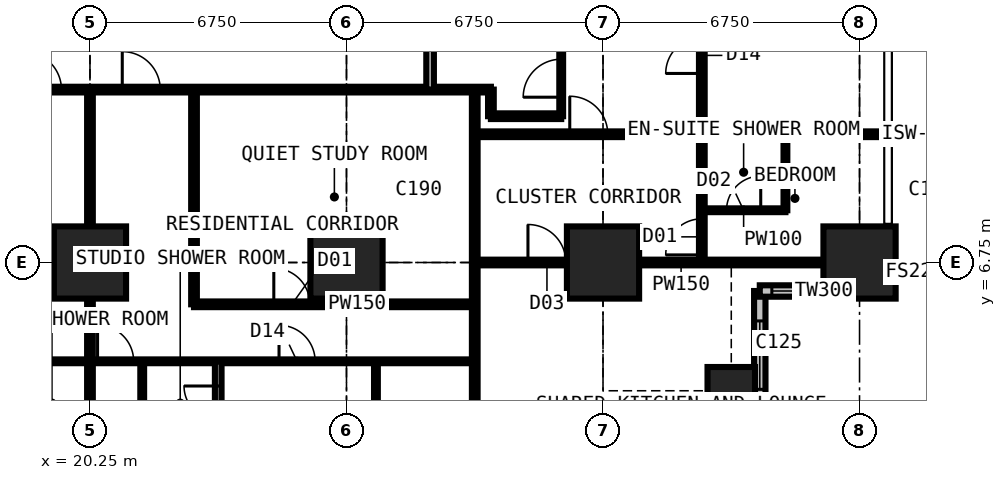
"""IFC4 building model, lengths in metres.
Left out: names, types, materials, properties, quantities, classifications, styles, units other than length and angle.
Written with IfcOpenShell. Run it as: python <this file> out.ifc"""

import sys

from ifc_helpers import new_model, si_unit, direction, frame, frame_2d, origin, origin_2d, place, context, subcontext, project, spatial, rectangle, extrude, element, fill, save


model = new_model("IFC4")
c1 = context("Model", 3, precision=1e-05, world=origin(), true_north=direction((0.0, 1.0)))
c2 = subcontext(c1, "Body", "Model", "MODEL_VIEW")
j1 = project(units=[si_unit("LENGTHUNIT", "METRE"), si_unit("PLANEANGLEUNIT", "RADIAN")], contexts=[c1])
p1 = place(None, origin())
s1 = spatial("IfcSite", under=j1, at=p1, CompositionType="ELEMENT")
p2 = place(p1, origin())
s2 = spatial("IfcBuilding", under=s1, at=p2, CompositionType="ELEMENT")
p3 = place(p2, frame((0.0, 0.0, 43.2)))
s3 = spatial("IfcBuildingStorey", under=s2, at=p3, CompositionType="ELEMENT", Elevation=43.2)
for number, where, z_axis, x_axis in (
    (1, (20.25, 6.75, 0.0), (0.0, 0.0, 1.0), (1.0, 0.0, 0.0)),
    (2, (27.0, 6.75, 0.0), (0.0, 0.0, 1.0), (1.0, 0.0, 0.0)),
    (3, (33.75, 6.75, 0.0), (0.0, 0.0, 1.0), (1.0, 0.0, 0.0)),
):
    element("IfcColumn", number, at=place(p3, frame(where, z_axis=z_axis, x_axis=x_axis)), inside=s3, PredefinedType="COLUMN", context=c2, shape_type="SweptSolid", body=[
        extrude(rectangle(XDim=1.9, YDim=1.9, at=origin_2d()), origin(), (0.0, 0.0, 1.0), 3.6),
    ])
p4 = place(p3, frame((37.125, 3.375, 0.0), z_axis=(0.0, 0.0, 1.0), x_axis=(1.0, 0.0, 0.0)))
e4 = element("IfcColumn", 4, at=p4, inside=s3, PredefinedType="COLUMN", context=c2, shape_type="SweptSolid", body=[
    extrude(rectangle(XDim=1.25, YDim=1.25, at=origin_2d()), origin(), (0.0, 0.0, 1.0), 3.6),
])
p5 = place(p3, frame((40.5, 6.75, 0.0), z_axis=(0.0, 0.0, 1.0), x_axis=(1.0, 0.0, 0.0)))
e5 = element("IfcColumn", 5, at=p5, inside=s3, PredefinedType="COLUMN", context=c2, shape_type="SweptSolid", body=[
    extrude(rectangle(XDim=1.9, YDim=1.9, at=origin_2d()), origin(), (0.0, 0.0, 1.0), 3.6),
])
p6 = place(p3, frame((37.875, 2.625, 0.0), z_axis=(0.0, 0.0, 1.0), x_axis=(0.0, 1.0, 0.0)))
e6 = element("IfcWall", 6, at=p6, inside=s3, PredefinedType="SOLIDWALL", context=c2, shape_type="SweptSolid", body=[
    extrude(rectangle(XDim=3.375, YDim=0.3, at=frame_2d((1.688, 0.0))), origin(), (0.0, 0.0, 1.0), 3.375),
])
p7 = place(p6, frame((0.788, 0.0, 0.6)))
e7 = element("IfcOpeningElement", 7, at=p7, cuts=e6, PredefinedType="OPENING", context=c2, shape_type="SweptSolid", body=[
    extrude(rectangle(XDim=1.8, YDim=2.1, at=frame_2d((0.9, 1.05))), frame((0.0, 0.16, 0.0), z_axis=(0.0, -1.0, 0.0), x_axis=(1.0, 0.0, 0.0)), (0.0, 0.0, 1.0), 0.32),
])
p8 = place(p3, frame((37.875, 6.0, 0.0), z_axis=(0.0, 0.0, 1.0), x_axis=(1.0, 0.0, 0.0)))
e8 = element("IfcWall", 8, at=p8, inside=s3, PredefinedType="SOLIDWALL", context=c2, shape_type="SweptSolid", body=[
    extrude(rectangle(XDim=3.375, YDim=0.3, at=frame_2d((1.688, 0.0))), origin(), (0.0, 0.0, 1.0), 3.375),
])
p9 = place(p8, frame((0.317, 0.0, 0.9)))
e9 = element("IfcOpeningElement", 9, at=p9, cuts=e8, PredefinedType="OPENING", context=c2, shape_type="SweptSolid", body=[
    extrude(rectangle(XDim=1.2, YDim=1.8, at=frame_2d((0.6, 0.9))), frame((0.0, 0.16, 0.0), z_axis=(0.0, -1.0, 0.0), x_axis=(1.0, 0.0, 0.0)), (0.0, 0.0, 1.0), 0.32),
])
p10 = place(p3, frame((6.75, 4.15, 0.0), z_axis=(0.0, 0.0, 1.0), x_axis=(1.0, 0.0, 0.0)))
e10 = element("IfcWall", 10, at=p10, inside=s3, PredefinedType="PARTITIONING", context=c2, shape_type="SweptSolid", body=[
    extrude(rectangle(XDim=23.625, YDim=0.1, at=frame_2d((11.812, 0.0))), origin(), (0.0, 0.0, 1.0), 3.375),
])
p11 = place(p10, frame((0.2, 0.0, 0.0)))
e11 = element("IfcOpeningElement", 11, at=p11, cuts=e10, PredefinedType="OPENING", context=c2, shape_type="SweptSolid", body=[
    extrude(rectangle(XDim=0.95, YDim=2.2, at=frame_2d((0.475, 1.1))), frame((0.0, 0.06, 0.0), z_axis=(0.0, -1.0, 0.0), x_axis=(1.0, 0.0, 0.0)), (0.0, 0.0, 1.0), 0.12),
])
p12 = place(p10, frame((3.625, 0.0, 0.0)))
e12 = element("IfcOpeningElement", 12, at=p12, cuts=e10, PredefinedType="OPENING", context=c2, shape_type="SweptSolid", body=[
    extrude(rectangle(XDim=0.95, YDim=2.2, at=frame_2d((0.475, 1.1))), frame((0.0, 0.06, 0.0), z_axis=(0.0, -1.0, 0.0), x_axis=(1.0, 0.0, 0.0)), (0.0, 0.0, 1.0), 0.12),
])
p13 = place(p10, frame((7.0, 0.0, 0.0)))
e13 = element("IfcOpeningElement", 13, at=p13, cuts=e10, PredefinedType="OPENING", context=c2, shape_type="SweptSolid", body=[
    extrude(rectangle(XDim=0.95, YDim=2.2, at=frame_2d((0.475, 1.1))), frame((0.0, 0.06, 0.0), z_axis=(0.0, -1.0, 0.0), x_axis=(1.0, 0.0, 0.0)), (0.0, 0.0, 1.0), 0.12),
])
p14 = place(p10, frame((10.375, 0.0, 0.0)))
e14 = element("IfcOpeningElement", 14, at=p14, cuts=e10, PredefinedType="OPENING", context=c2, shape_type="SweptSolid", body=[
    extrude(rectangle(XDim=0.95, YDim=2.2, at=frame_2d((0.475, 1.1))), frame((0.0, 0.06, 0.0), z_axis=(0.0, -1.0, 0.0), x_axis=(1.0, 0.0, 0.0)), (0.0, 0.0, 1.0), 0.12),
])
p15 = place(p10, frame((18.475, 0.0, 0.0)))
e15 = element("IfcOpeningElement", 15, at=p15, cuts=e10, PredefinedType="OPENING", context=c2, shape_type="SweptSolid", body=[
    extrude(rectangle(XDim=0.95, YDim=2.2, at=frame_2d((0.475, 1.1))), frame((0.0, 0.06, 0.0), z_axis=(0.0, -1.0, 0.0), x_axis=(1.0, 0.0, 0.0)), (0.0, 0.0, 1.0), 0.12),
])
p16 = place(p10, frame((13.7, 0.0, 0.0)))
e16 = element("IfcOpeningElement", 16, at=p16, cuts=e10, PredefinedType="OPENING", context=c2, shape_type="SweptSolid", body=[
    extrude(rectangle(XDim=0.95, YDim=2.2, at=frame_2d((0.475, 1.1))), frame((0.0, 0.06, 0.0), z_axis=(0.0, -1.0, 0.0), x_axis=(1.0, 0.0, 0.0)), (0.0, 0.0, 1.0), 0.12),
])
p17 = place(p3, frame((10.125, 11.3, 0.0), z_axis=(0.0, 0.0, 1.0), x_axis=(1.0, 0.0, 0.0)))
e17 = element("IfcWall", 17, at=p17, inside=s3, PredefinedType="PARTITIONING", context=c2, shape_type="SweptSolid", body=[
    extrude(rectangle(XDim=20.675, YDim=0.15, at=frame_2d((10.337, 0.0))), origin(), (0.0, 0.0, 1.0), 3.375),
])
p18 = place(p17, frame((8.375, 0.0, 0.0)))
e18 = element("IfcOpeningElement", 18, at=p18, cuts=e17, PredefinedType="OPENING", context=c2, shape_type="SweptSolid", body=[
    extrude(rectangle(XDim=1.0, YDim=2.2, at=frame_2d((0.5, 1.1))), frame((0.0, 0.085, 0.0), z_axis=(0.0, -1.0, 0.0), x_axis=(1.0, 0.0, 0.0)), (0.0, 0.0, 1.0), 0.17),
])
p19 = place(p17, frame((10.975, 0.0, 0.0)))
e19 = element("IfcOpeningElement", 19, at=p19, cuts=e17, PredefinedType="OPENING", context=c2, shape_type="SweptSolid", body=[
    extrude(rectangle(XDim=1.0, YDim=2.2, at=frame_2d((0.5, 1.1))), frame((0.0, 0.085, 0.0), z_axis=(0.0, -1.0, 0.0), x_axis=(1.0, 0.0, 0.0)), (0.0, 0.0, 1.0), 0.17),
])
p20 = place(p17, frame((3.925, 0.0, 0.0)))
e20 = element("IfcOpeningElement", 20, at=p20, cuts=e17, PredefinedType="OPENING", context=c2, shape_type="SweptSolid", body=[
    extrude(rectangle(XDim=0.95, YDim=2.2, at=frame_2d((0.475, 1.1))), frame((0.0, 0.085, 0.0), z_axis=(0.0, -1.0, 0.0), x_axis=(1.0, 0.0, 0.0)), (0.0, 0.0, 1.0), 0.17),
])
p21 = place(p3, frame((20.25, -0.734, 0.0), z_axis=(0.0, 0.0, 1.0), x_axis=(0.0, 1.0, 0.0)))
e21 = element("IfcWall", 21, at=p21, inside=s3, PredefinedType="PARTITIONING", context=c2, shape_type="SweptSolid", body=[
    extrude(rectangle(XDim=12.034, YDim=0.15, at=frame_2d((6.017, 0.0))), origin(), (0.0, 0.0, 1.0), 2.61),
])
p22 = place(p3, frame((21.625, 1.95, 0.0), z_axis=(0.0, 0.0, 1.0), x_axis=(0.0, 1.0, 0.0)))
e22 = element("IfcWall", 22, at=p22, inside=s3, PredefinedType="PARTITIONING", context=c2, shape_type="SweptSolid", body=[
    extrude(rectangle(XDim=2.2, YDim=0.1, at=frame_2d((1.1, 0.0))), origin(), (0.0, 0.0, 1.0), 3.375),
])
p23 = place(p3, frame((22.988, 5.65, 0.0), z_axis=(0.0, 0.0, 1.0), x_axis=(1.0, 0.0, 0.0)))
e23 = element("IfcWall", 23, at=p23, inside=s3, PredefinedType="PARTITIONING", context=c2, shape_type="SweptSolid", body=[
    extrude(rectangle(XDim=7.387, YDim=0.15, at=frame_2d((3.694, 0.0))), origin(), (0.0, 0.0, 1.0), 3.375),
])
p24 = place(p23, frame((2.1, 0.0, 0.0)))
e24 = element("IfcOpeningElement", 24, at=p24, cuts=e23, PredefinedType="OPENING", context=c2, shape_type="SweptSolid", body=[
    extrude(rectangle(XDim=0.95, YDim=2.2, at=frame_2d((0.475, 1.1))), frame((0.0, 0.085, 0.0), z_axis=(0.0, -1.0, 0.0), x_axis=(1.0, 0.0, 0.0)), (0.0, 0.0, 1.0), 0.17),
])
p25 = place(p3, frame((22.988, 5.65, 0.0), z_axis=(0.0, 0.0, 1.0), x_axis=(0.0, 1.0, 0.0)))
e25 = element("IfcWall", 25, at=p25, inside=s3, PredefinedType="PARTITIONING", context=c2, shape_type="SweptSolid", body=[
    extrude(rectangle(XDim=5.65, YDim=0.15, at=frame_2d((2.825, 0.0))), origin(), (0.0, 0.0, 1.0), 3.375),
])
p26 = place(p3, frame((23.625, -0.734, 0.0), z_axis=(0.0, 0.0, 1.0), x_axis=(0.0, 1.0, 0.0)))
e26 = element("IfcWall", 26, at=p26, inside=s3, PredefinedType="PARTITIONING", context=c2, shape_type="SweptSolid", body=[
    extrude(rectangle(XDim=4.884, YDim=0.175, at=frame_2d((2.442, 0.0))), origin(), (0.0, 0.0, 1.0), 3.375),
])
p27 = place(p26, frame((3.334, 0.0, 0.0)))
e27 = element("IfcOpeningElement", 27, at=p27, cuts=e26, PredefinedType="OPENING", context=c2, shape_type="SweptSolid", body=[
    extrude(rectangle(XDim=0.9, YDim=2.2, at=frame_2d((0.45, 1.1))), frame((0.0, 0.097, 0.0), z_axis=(0.0, -1.0, 0.0), x_axis=(1.0, 0.0, 0.0)), (0.0, 0.0, 1.0), 0.195),
])
p28 = place(p3, frame((27.775, 1.75, 0.0), z_axis=(0.0, 0.0, 1.0), x_axis=(0.0, 1.0, 0.0)))
e28 = element("IfcWall", 28, at=p28, inside=s3, PredefinedType="PARTITIONING", context=c2, shape_type="SweptSolid", body=[
    extrude(rectangle(XDim=2.4, YDim=0.1, at=frame_2d((1.2, 0.0))), origin(), (0.0, 0.0, 1.0), 3.375),
])
p29 = place(p3, frame((29.2, 11.3, 0.0), z_axis=(0.0, 0.0, 1.0), x_axis=(0.0, 1.0, 0.0)))
e29 = element("IfcWall", 29, at=p29, inside=s3, PredefinedType="PARTITIONING", context=c2, shape_type="SweptSolid", body=[
    extrude(rectangle(XDim=17.9, YDim=0.2, at=frame_2d((8.95, 0.0))), origin(), (0.0, 0.0, 1.0), 3.375),
])
p30 = place(p29, frame((8.35, 0.0, 0.0)))
e30 = element("IfcOpeningElement", 30, at=p30, cuts=e29, PredefinedType="OPENING", context=c2, shape_type="SweptSolid", body=[
    extrude(rectangle(XDim=1.2, YDim=2.2, at=frame_2d((0.6, 1.1))), frame((0.0, 0.11, 0.0), z_axis=(0.0, -1.0, 0.0), x_axis=(1.0, 0.0, 0.0)), (0.0, 0.0, 1.0), 0.22),
])
p31 = place(p3, frame((30.375, -0.734, 0.0), z_axis=(0.0, 0.0, 1.0), x_axis=(0.0, 1.0, 0.0)))
e31 = element("IfcWall", 31, at=p31, inside=s3, PredefinedType="PARTITIONING", context=c2, shape_type="SweptSolid", body=[
    extrude(rectangle(XDim=12.034, YDim=0.15, at=frame_2d((6.017, 0.0))), origin(), (0.0, 0.0, 1.0), 3.375),
])
p32 = place(p3, frame((30.375, 6.75, 0.0), z_axis=(0.0, 0.0, 1.0), x_axis=(1.0, 0.0, 0.0)))
e32 = element("IfcWall", 32, at=p32, inside=s3, PredefinedType="PARTITIONING", context=c2, shape_type="SweptSolid", body=[
    extrude(rectangle(XDim=10.859, YDim=0.15, at=frame_2d((5.429, 0.0))), origin(), (0.0, 0.0, 1.0), 2.877),
])
p33 = place(p32, frame((1.4, 0.0, 0.0)))
e33 = element("IfcOpeningElement", 33, at=p33, cuts=e32, PredefinedType="OPENING", context=c2, shape_type="SweptSolid", body=[
    extrude(rectangle(XDim=1.0, YDim=2.2, at=frame_2d((0.5, 1.1))), frame((0.0, 0.085, 0.0), z_axis=(0.0, -1.0, 0.0), x_axis=(1.0, 0.0, 0.0)), (0.0, 0.0, 1.0), 0.17),
])
p34 = place(p3, frame((30.375, 10.125, 0.0), z_axis=(0.0, 0.0, 1.0), x_axis=(1.0, 0.0, 0.0)))
e34 = element("IfcWall", 34, at=p34, inside=s3, PredefinedType="PARTITIONING", context=c2, shape_type="SweptSolid", body=[
    extrude(rectangle(XDim=10.859, YDim=0.15, at=frame_2d((5.429, 0.0))), origin(), (0.0, 0.0, 1.0), 3.375),
])
p35 = place(p34, frame((2.5, 0.0, 0.0)))
e35 = element("IfcOpeningElement", 35, at=p35, cuts=e34, PredefinedType="OPENING", context=c2, shape_type="SweptSolid", body=[
    extrude(rectangle(XDim=1.0, YDim=2.2, at=frame_2d((0.5, 1.1))), frame((0.0, 0.085, 0.0), z_axis=(0.0, -1.0, 0.0), x_axis=(1.0, 0.0, 0.0)), (0.0, 0.0, 1.0), 0.17),
])
p36 = place(p3, frame((30.8, 10.6, 0.0), z_axis=(0.0, 0.0, 1.0), x_axis=(0.0, 1.0, 0.0)))
e36 = element("IfcWall", 36, at=p36, inside=s3, PredefinedType="PARTITIONING", context=c2, shape_type="SweptSolid", body=[
    extrude(rectangle(XDim=0.7, YDim=0.15, at=frame_2d((0.35, 0.0))), origin(), (0.0, 0.0, 1.0), 3.375),
])
p37 = place(p3, frame((30.8, 10.6, 0.0), z_axis=(0.0, 0.0, 1.0), x_axis=(1.0, 0.0, 0.0)))
e37 = element("IfcWall", 37, at=p37, inside=s3, PredefinedType="PARTITIONING", context=c2, shape_type="SweptSolid", body=[
    extrude(rectangle(XDim=1.85, YDim=0.15, at=frame_2d((0.925, 0.0))), origin(), (0.0, 0.0, 1.0), 3.375),
])
p38 = place(p3, frame((32.65, 10.6, 0.0), z_axis=(0.0, 0.0, 1.0), x_axis=(0.0, 1.0, 0.0)))
e38 = element("IfcWall", 38, at=p38, inside=s3, PredefinedType="SHEAR", context=c2, shape_type="SweptSolid", body=[
    extrude(rectangle(XDim=9.3, YDim=0.1, at=frame_2d((4.65, 0.0))), origin(), (0.0, 0.0, 1.0), 3.375),
])
p39 = place(p38, frame((0.5, 0.0, 0.0)))
e39 = element("IfcOpeningElement", 39, at=p39, cuts=e38, PredefinedType="OPENING", context=c2, shape_type="SweptSolid", body=[
    extrude(rectangle(XDim=1.0, YDim=2.2, at=frame_2d((0.5, 1.1))), frame((0.0, 0.06, 0.0), z_axis=(0.0, -1.0, 0.0), x_axis=(1.0, 0.0, 0.0)), (0.0, 0.0, 1.0), 0.12),
])
p40 = place(p3, frame((36.35, 6.75, 0.0), z_axis=(0.0, 0.0, 1.0), x_axis=(0.0, 1.0, 0.0)))
e40 = element("IfcWall", 40, at=p40, inside=s3, PredefinedType="PARTITIONING", context=c2, shape_type="SweptSolid", body=[
    extrude(rectangle(XDim=23.625, YDim=0.15, at=frame_2d((11.812, 0.0))), origin(), (0.0, 0.0, 1.0), 3.375),
])
p41 = place(p40, frame((0.2, 0.0, 0.0)))
e41 = element("IfcOpeningElement", 41, at=p41, cuts=e40, PredefinedType="OPENING", context=c2, shape_type="SweptSolid", body=[
    extrude(rectangle(XDim=0.95, YDim=2.2, at=frame_2d((0.475, 1.1))), frame((0.0, 0.085, 0.0), z_axis=(0.0, -1.0, 0.0), x_axis=(1.0, 0.0, 0.0)), (0.0, 0.0, 1.0), 0.17),
])
p42 = place(p40, frame((18.475, 0.0, 0.0)))
e42 = element("IfcOpeningElement", 42, at=p42, cuts=e40, PredefinedType="OPENING", context=c2, shape_type="SweptSolid", body=[
    extrude(rectangle(XDim=0.95, YDim=2.2, at=frame_2d((0.475, 1.1))), frame((0.0, 0.085, 0.0), z_axis=(0.0, -1.0, 0.0), x_axis=(1.0, 0.0, 0.0)), (0.0, 0.0, 1.0), 0.17),
])
p43 = place(p40, frame((11.725, 0.0, 0.0)))
e43 = element("IfcOpeningElement", 43, at=p43, cuts=e40, PredefinedType="OPENING", context=c2, shape_type="SweptSolid", body=[
    extrude(rectangle(XDim=0.95, YDim=2.2, at=frame_2d((0.475, 1.1))), frame((0.0, 0.085, 0.0), z_axis=(0.0, -1.0, 0.0), x_axis=(1.0, 0.0, 0.0)), (0.0, 0.0, 1.0), 0.17),
])
p44 = place(p40, frame((4.975, 0.0, 0.0)))
e44 = element("IfcOpeningElement", 44, at=p44, cuts=e40, PredefinedType="OPENING", context=c2, shape_type="SweptSolid", body=[
    extrude(rectangle(XDim=0.95, YDim=2.2, at=frame_2d((0.475, 1.1))), frame((0.0, 0.085, 0.0), z_axis=(0.0, -1.0, 0.0), x_axis=(1.0, 0.0, 0.0)), (0.0, 0.0, 1.0), 0.17),
])
p45 = place(p3, frame((36.35, 8.125, 0.0), z_axis=(0.0, 0.0, 1.0), x_axis=(1.0, 0.0, 0.0)))
e45 = element("IfcWall", 45, at=p45, inside=s3, PredefinedType="PARTITIONING", context=c2, shape_type="SweptSolid", body=[
    extrude(rectangle(XDim=2.2, YDim=0.1, at=frame_2d((1.1, 0.0))), origin(), (0.0, 0.0, 1.0), 3.375),
])
p46 = place(p45, frame((0.65, 0.0, 0.0)))
e46 = element("IfcOpeningElement", 46, at=p46, cuts=e45, PredefinedType="OPENING", context=c2, shape_type="SweptSolid", body=[
    extrude(rectangle(XDim=0.9, YDim=2.2, at=frame_2d((0.45, 1.1))), frame((0.0, 0.06, 0.0), z_axis=(0.0, -1.0, 0.0), x_axis=(1.0, 0.0, 0.0)), (0.0, 0.0, 1.0), 0.12),
])
p47 = place(p3, frame((38.55, 8.125, 0.0), z_axis=(0.0, 0.0, 1.0), x_axis=(0.0, 1.0, 0.0)))
e47 = element("IfcWall", 47, at=p47, inside=s3, PredefinedType="PARTITIONING", context=c2, shape_type="SweptSolid", body=[
    extrude(rectangle(XDim=2.0, YDim=0.1, at=frame_2d((1.0, 0.0))), origin(), (0.0, 0.0, 1.0), 3.375),
])
p48 = place(p7, origin())
e48 = element("IfcWindow", 48, at=p48, inside=s3, PartitioningType="SINGLE_PANEL", PredefinedType="WINDOW", context=c2, shape_type="SweptSolid", body=[
    extrude(rectangle(XDim=1.8, YDim=2.1, at=frame_2d((0.9, 1.05))), frame((0.0, 0.03, 0.0), z_axis=(0.0, -1.0, 0.0), x_axis=(1.0, 0.0, 0.0)), (0.0, 0.0, 1.0), 0.06),
])
fill(e7, e48)
p49 = place(p9, origin())
e49 = element("IfcWindow", 49, at=p49, inside=s3, PartitioningType="SINGLE_PANEL", PredefinedType="WINDOW", context=c2, shape_type="SweptSolid", body=[
    extrude(rectangle(XDim=1.2, YDim=1.8, at=frame_2d((0.6, 0.9))), frame((0.0, 0.03, 0.0), z_axis=(0.0, -1.0, 0.0), x_axis=(1.0, 0.0, 0.0)), (0.0, 0.0, 1.0), 0.06),
])
fill(e9, e49)
p50 = place(p18, origin())
e50 = element("IfcDoor", 50, at=p50, inside=s3, OperationType="SINGLE_SWING_LEFT", PredefinedType="DOOR", context=c2, shape_type="SweptSolid", body=[
    extrude(rectangle(XDim=1.0, YDim=2.2, at=frame_2d((0.5, 1.1))), frame((0.0, 0.025, 0.0), z_axis=(0.0, -1.0, 0.0), x_axis=(1.0, 0.0, 0.0)), (0.0, 0.0, 1.0), 0.05),
])
fill(e18, e50)
p51 = place(p15, origin())
e51 = element("IfcDoor", 51, at=p51, inside=s3, OperationType="SINGLE_SWING_LEFT", PredefinedType="DOOR", context=c2, shape_type="SweptSolid", body=[
    extrude(rectangle(XDim=0.95, YDim=2.2, at=frame_2d((0.475, 1.1))), frame((0.0, 0.025, 0.0), z_axis=(0.0, -1.0, 0.0), x_axis=(1.0, 0.0, 0.0)), (0.0, 0.0, 1.0), 0.05),
])
fill(e15, e51)
p52 = place(p16, origin())
e52 = element("IfcDoor", 52, at=p52, inside=s3, OperationType="SINGLE_SWING_LEFT", PredefinedType="DOOR", context=c2, shape_type="SweptSolid", body=[
    extrude(rectangle(XDim=0.95, YDim=2.2, at=frame_2d((0.475, 1.1))), frame((0.0, 0.025, 0.0), z_axis=(0.0, -1.0, 0.0), x_axis=(1.0, 0.0, 0.0)), (0.0, 0.0, 1.0), 0.05),
])
fill(e16, e52)
p53 = place(p27, origin())
e53 = element("IfcDoor", 53, at=p53, inside=s3, OperationType="SINGLE_SWING_RIGHT", PredefinedType="DOOR", context=c2, shape_type="SweptSolid", body=[
    extrude(rectangle(XDim=0.9, YDim=2.2, at=frame_2d((0.45, 1.1))), frame((0.0, 0.025, 0.0), z_axis=(0.0, -1.0, 0.0), x_axis=(1.0, 0.0, 0.0)), (0.0, 0.0, 1.0), 0.05),
])
fill(e27, e53)
p54 = place(p19, origin())
e54 = element("IfcDoor", 54, at=p54, inside=s3, OperationType="SINGLE_SWING_LEFT", PredefinedType="DOOR", context=c2, shape_type="SweptSolid", body=[
    extrude(rectangle(XDim=1.0, YDim=2.2, at=frame_2d((0.5, 1.1))), frame((0.0, 0.025, 0.0), z_axis=(0.0, -1.0, 0.0), x_axis=(1.0, 0.0, 0.0)), (0.0, 0.0, 1.0), 0.05),
])
fill(e19, e54)
p55 = place(p24, origin())
e55 = element("IfcDoor", 55, at=p55, inside=s3, OperationType="SINGLE_SWING_LEFT", PredefinedType="DOOR", context=c2, shape_type="SweptSolid", body=[
    extrude(rectangle(XDim=0.95, YDim=2.2, at=frame_2d((0.475, 1.1))), frame((0.0, 0.025, 0.0), z_axis=(0.0, -1.0, 0.0), x_axis=(1.0, 0.0, 0.0)), (0.0, 0.0, 1.0), 0.05),
])
fill(e24, e55)
p56 = place(p33, origin())
e56 = element("IfcDoor", 56, at=p56, inside=s3, OperationType="SINGLE_SWING_LEFT", PredefinedType="DOOR", context=c2, shape_type="SweptSolid", body=[
    extrude(rectangle(XDim=1.0, YDim=2.2, at=frame_2d((0.5, 1.1))), frame((0.0, 0.025, 0.0), z_axis=(0.0, -1.0, 0.0), x_axis=(1.0, 0.0, 0.0)), (0.0, 0.0, 1.0), 0.05),
])
fill(e33, e56)
p57 = place(p41, origin())
e57 = element("IfcDoor", 57, at=p57, inside=s3, OperationType="SINGLE_SWING_LEFT", PredefinedType="DOOR", context=c2, shape_type="SweptSolid", body=[
    extrude(rectangle(XDim=0.95, YDim=2.2, at=frame_2d((0.475, 1.1))), frame((0.0, 0.025, 0.0), z_axis=(0.0, -1.0, 0.0), x_axis=(1.0, 0.0, 0.0)), (0.0, 0.0, 1.0), 0.05),
])
fill(e41, e57)
p58 = place(p46, origin())
e58 = element("IfcDoor", 58, at=p58, inside=s3, OperationType="SINGLE_SWING_RIGHT", PredefinedType="DOOR", context=c2, shape_type="SweptSolid", body=[
    extrude(rectangle(XDim=0.9, YDim=2.2, at=frame_2d((0.45, 1.1))), frame((0.0, 0.025, 0.0), z_axis=(0.0, -1.0, 0.0), x_axis=(1.0, 0.0, 0.0)), (0.0, 0.0, 1.0), 0.05),
])
fill(e46, e58)
p59 = place(p35, origin())
e59 = element("IfcDoor", 59, at=p59, inside=s3, OperationType="SINGLE_SWING_LEFT", PredefinedType="DOOR", context=c2, shape_type="SweptSolid", body=[
    extrude(rectangle(XDim=1.0, YDim=2.2, at=frame_2d((0.5, 1.1))), frame((0.0, 0.025, 0.0), z_axis=(0.0, -1.0, 0.0), x_axis=(1.0, 0.0, 0.0)), (0.0, 0.0, 1.0), 0.05),
])
fill(e35, e59)
p60 = place(p44, origin())
e60 = element("IfcDoor", 60, at=p60, inside=s3, OperationType="SINGLE_SWING_LEFT", PredefinedType="DOOR", context=c2, shape_type="SweptSolid", body=[
    extrude(rectangle(XDim=0.95, YDim=2.2, at=frame_2d((0.475, 1.1))), frame((0.0, 0.025, 0.0), z_axis=(0.0, -1.0, 0.0), x_axis=(1.0, 0.0, 0.0)), (0.0, 0.0, 1.0), 0.05),
])
fill(e44, e60)
p61 = place(p39, origin())
e61 = element("IfcDoor", 61, at=p61, inside=s3, OperationType="SINGLE_SWING_LEFT", PredefinedType="DOOR", context=c2, shape_type="SweptSolid", body=[
    extrude(rectangle(XDim=1.0, YDim=2.2, at=frame_2d((0.5, 1.1))), frame((0.0, 0.025, 0.0), z_axis=(0.0, -1.0, 0.0), x_axis=(1.0, 0.0, 0.0)), (0.0, 0.0, 1.0), 0.05),
])
fill(e39, e61)
save(model, sys.argv[1])
